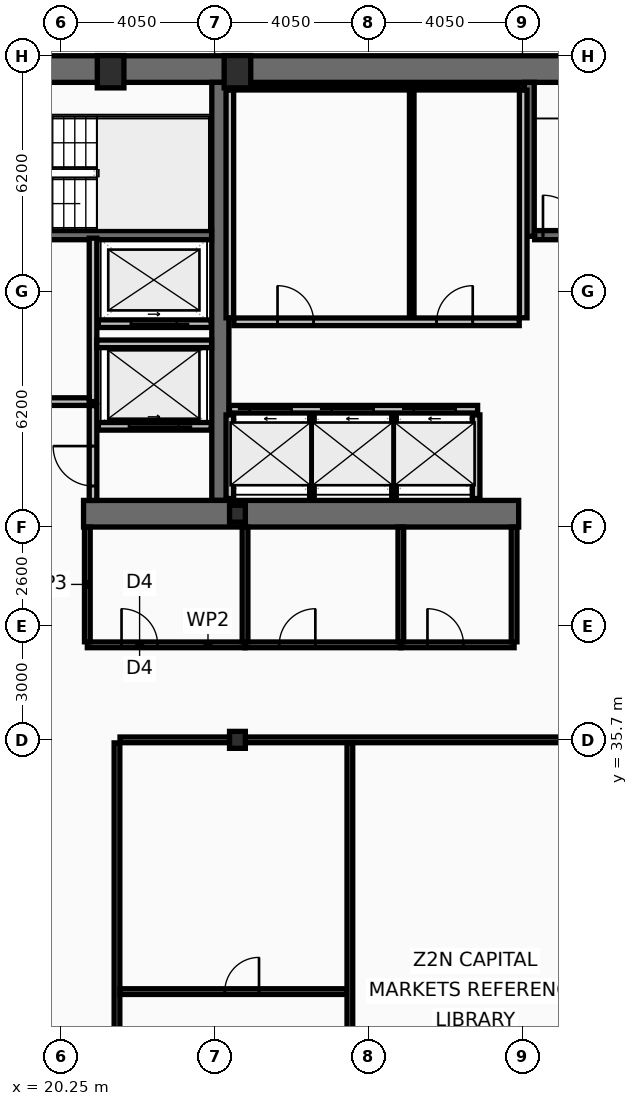
"""IFC4 building model, lengths in metres.
Left out: names, types, materials, properties, quantities, classifications, styles, units other than length and angle.
Written with IfcOpenShell. Run it as: python <this file> out.ifc"""

import sys

from ifc_helpers import new_model, si_unit, direction, frame, frame_2d, origin, origin_2d, place, context, subcontext, project, spatial, rectangle, hollow_rectangle, i_section, extrude, element, fill, save


model = new_model("IFC4")
c1 = context("Model", 3, precision=1e-05, world=origin(), true_north=direction((0.0, 1.0)))
c2 = subcontext(c1, "Body", "Model", "MODEL_VIEW")
j1 = project(units=[si_unit("LENGTHUNIT", "METRE"), si_unit("PLANEANGLEUNIT", "RADIAN")], contexts=[c1])
p1 = place(None, origin())
s1 = spatial("IfcSite", under=j1, at=p1, CompositionType="ELEMENT")
p2 = place(p1, origin())
s2 = spatial("IfcBuilding", under=s1, at=p2, CompositionType="ELEMENT")
p3 = place(p2, frame((0.0, 0.0, 114.6)))
s3 = spatial("IfcBuildingStorey", under=s2, at=p3, CompositionType="ELEMENT", Elevation=114.6)
p4 = place(p3, frame((16.2, 53.35, 0.0), z_axis=(0.0, 0.0, 1.0), x_axis=(1.0, 0.0, 0.0)))
e1 = element("IfcWall", 1, at=p4, inside=s3, PredefinedType="SHEAR", context=c2, shape_type="SweptSolid", body=[
    extrude(rectangle(XDim=40.5, YDim=0.7, at=frame_2d((20.25, 0.0))), origin(), (0.0, 0.0, 1.0), 3.44),
])
p5 = place(p3, frame((24.45, 42.0, 0.0), z_axis=(0.0, 0.0, 1.0), x_axis=(0.0, 1.0, 0.0)))
e2 = element("IfcWall", 2, at=p5, inside=s3, PredefinedType="SHEAR", context=c2, shape_type="SweptSolid", body=[
    extrude(rectangle(XDim=11.0, YDim=0.45, at=frame_2d((5.5, 0.0))), origin(), (0.0, 0.0, 1.0), 3.44),
])
p6 = place(p3, frame((32.3, 41.65, 0.0), z_axis=(0.0, 0.0, 1.0), x_axis=(-1.0, 0.0, 0.0)))
e3 = element("IfcWall", 3, at=p6, inside=s3, PredefinedType="SHEAR", context=c2, shape_type="SweptSolid", body=[
    extrude(rectangle(XDim=11.45, YDim=0.7, at=frame_2d((5.725, 0.0))), origin(), (0.0, 0.0, 1.0), 3.44),
])
p7 = place(p3, frame((32.58, 48.95, 0.0), z_axis=(0.0, 0.0, 1.0), x_axis=(0.0, 1.0, 0.0)))
e4 = element("IfcWall", 4, at=p7, inside=s3, PredefinedType="SHEAR", context=c2, shape_type="SweptSolid", body=[
    extrude(rectangle(XDim=4.05, YDim=0.26, at=frame_2d((2.025, 0.0))), origin(), (0.0, 0.0, 1.0), 3.44),
])
p8 = place(p3, frame((16.9, 48.98, 0.0), z_axis=(0.0, 0.0, 1.0), x_axis=(1.0, 0.0, 0.0)))
e5 = element("IfcWall", 5, at=p8, inside=s3, PredefinedType="SHEAR", context=c2, shape_type="SweptSolid", body=[
    extrude(rectangle(XDim=7.32, YDim=0.24, at=frame_2d((3.66, 0.0))), origin(), (0.0, 0.0, 1.0), 3.44),
])
p9 = place(p8, frame((0.22, 0.0, 0.0)))
e6 = element("IfcOpeningElement", 6, at=p9, cuts=e5, PredefinedType="OPENING", context=c2, shape_type="SweptSolid", body=[
    extrude(rectangle(XDim=1.05, YDim=2.15, at=frame_2d((0.525, 1.075))), frame((0.0, 0.13, 0.0), z_axis=(0.0, -1.0, 0.0), x_axis=(1.0, 0.0, 0.0)), (0.0, 0.0, 1.0), 0.26),
])
p10 = place(p3, frame((32.72, 48.98, 0.0), z_axis=(0.0, 0.0, 1.0), x_axis=(1.0, 0.0, 0.0)))
e7 = element("IfcWall", 7, at=p10, inside=s3, PredefinedType="SHEAR", context=c2, shape_type="SweptSolid", body=[
    extrude(rectangle(XDim=7.56, YDim=0.24, at=frame_2d((3.78, 0.0))), origin(), (0.0, 0.0, 1.0), 3.44),
])
p11 = place(p10, frame((0.22, 0.0, 0.0)))
e8 = element("IfcOpeningElement", 8, at=p11, cuts=e7, PredefinedType="OPENING", context=c2, shape_type="SweptSolid", body=[
    extrude(rectangle(XDim=1.05, YDim=2.15, at=frame_2d((0.525, 1.075))), frame((0.0, 0.13, 0.0), z_axis=(0.0, -1.0, 0.0), x_axis=(1.0, 0.0, 0.0)), (0.0, 0.0, 1.0), 0.26),
])
for number, where, z_axis, x_axis in (
    (9, (21.562, 53.28, 0.0), (0.0, 0.0, 1.0), (1.0, 0.0, 0.0)),
    (10, (24.9, 53.28, 0.0), (0.0, 0.0, 1.0), (1.0, 0.0, 0.0)),
):
    element("IfcColumn", number, at=place(p3, frame(where, z_axis=z_axis, x_axis=x_axis)), inside=s3, PredefinedType="COLUMN", context=c2, shape_type="SweptSolid", body=[
        extrude(hollow_rectangle(XDim=0.7, YDim=0.85, WallThickness=0.05, at=origin_2d()), origin(), (0.0, 0.0, 1.0), 3.6),
    ])
for number, where, z_axis, x_axis in (
    (11, (24.9, 35.7, 0.0), (0.0, 0.0, 1.0), (1.0, 0.0, 0.0)),
    (12, (24.9, 41.65, 0.0), (0.0, 0.0, 1.0), (1.0, 0.0, 0.0)),
):
    element("IfcColumn", number, at=place(p3, frame(where, z_axis=z_axis, x_axis=x_axis)), inside=s3, PredefinedType="COLUMN", context=c2, shape_type="SweptSolid", body=[
        extrude(i_section(OverallWidth=0.416, OverallDepth=0.446, WebThickness=0.039, FlangeThickness=0.063, at=origin_2d()), origin(), (0.0, 0.0, 1.0), 3.6),
    ])
p12 = place(p3, frame((24.69, 44.4, 0.0), z_axis=(0.0, 0.0, 1.0), x_axis=(1.0, 0.0, 0.0)))
e13 = element("IfcWall", 13, at=p12, inside=s3, PredefinedType="PARTITIONING", context=c2, shape_type="SweptSolid", body=[
    extrude(rectangle(XDim=6.53, YDim=0.2, at=frame_2d((3.265, 0.0))), origin(), (0.0, 0.0, 1.0), 3.44),
])
p13 = place(p12, frame((0.53, 0.0, 0.0)))
e14 = element("IfcOpeningElement", 14, at=p13, cuts=e13, PredefinedType="OPENING", context=c2, shape_type="SweptSolid", body=[
    extrude(rectangle(XDim=1.1, YDim=2.18, at=frame_2d((0.55, 1.09))), frame((0.0, 0.11, 0.0), z_axis=(0.0, -1.0, 0.0), x_axis=(1.0, 0.0, 0.0)), (0.0, 0.0, 1.0), 0.22),
])
p14 = place(p12, frame((2.69, 0.0, 0.0)))
e15 = element("IfcOpeningElement", 15, at=p14, cuts=e13, PredefinedType="OPENING", context=c2, shape_type="SweptSolid", body=[
    extrude(rectangle(XDim=1.1, YDim=2.18, at=frame_2d((0.55, 1.09))), frame((0.0, 0.11, 0.0), z_axis=(0.0, -1.0, 0.0), x_axis=(1.0, 0.0, 0.0)), (0.0, 0.0, 1.0), 0.22),
])
p15 = place(p12, frame((4.85, 0.0, 0.0)))
e16 = element("IfcOpeningElement", 16, at=p15, cuts=e13, PredefinedType="OPENING", context=c2, shape_type="SweptSolid", body=[
    extrude(rectangle(XDim=1.1, YDim=2.18, at=frame_2d((0.55, 1.09))), frame((0.0, 0.11, 0.0), z_axis=(0.0, -1.0, 0.0), x_axis=(1.0, 0.0, 0.0)), (0.0, 0.0, 1.0), 0.22),
])
p16 = place(p3, frame((24.21, 43.95, 0.0), z_axis=(0.0, 0.0, 1.0), x_axis=(-1.0, 0.0, 0.0)))
e17 = element("IfcWall", 17, at=p16, inside=s3, PredefinedType="PARTITIONING", context=c2, shape_type="SweptSolid", body=[
    extrude(rectangle(XDim=2.97, YDim=0.2, at=frame_2d((1.485, 0.0))), origin(), (0.0, 0.0, 1.0), 3.44),
])
p17 = place(p16, frame((0.86, 0.0, 0.0)))
e18 = element("IfcOpeningElement", 18, at=p17, cuts=e17, PredefinedType="OPENING", context=c2, shape_type="SweptSolid", body=[
    extrude(rectangle(XDim=1.3, YDim=2.18, at=frame_2d((0.65, 1.09))), frame((0.0, 0.11, 0.0), z_axis=(0.0, -1.0, 0.0), x_axis=(1.0, 0.0, 0.0)), (0.0, 0.0, 1.0), 0.22),
])
p18 = place(p3, frame((24.21, 46.65, 0.0), z_axis=(0.0, 0.0, 1.0), x_axis=(-1.0, 0.0, 0.0)))
e19 = element("IfcWall", 19, at=p18, inside=s3, PredefinedType="PARTITIONING", context=c2, shape_type="SweptSolid", body=[
    extrude(rectangle(XDim=2.97, YDim=0.2, at=frame_2d((1.485, 0.0))), origin(), (0.0, 0.0, 1.0), 3.44),
])
p19 = place(p18, frame((0.91, 0.0, 0.0)))
e20 = element("IfcOpeningElement", 20, at=p19, cuts=e19, PredefinedType="OPENING", context=c2, shape_type="SweptSolid", body=[
    extrude(rectangle(XDim=1.2, YDim=2.18, at=frame_2d((0.6, 1.09))), frame((0.0, 0.11, 0.0), z_axis=(0.0, -1.0, 0.0), x_axis=(1.0, 0.0, 0.0)), (0.0, 0.0, 1.0), 0.22),
])
p20 = place(p3, frame((21.1, 44.6, 0.0), z_axis=(0.0, 0.0, 1.0), x_axis=(0.0, 1.0, 0.0)))
e21 = element("IfcWall", 21, at=p20, inside=s3, PredefinedType="PARTITIONING", context=c2, shape_type="SweptSolid", body=[
    extrude(rectangle(XDim=4.3, YDim=0.2, at=frame_2d((2.15, 0.0))), origin(), (0.0, 0.0, 1.0), 3.44),
])
p21 = place(p3, frame((16.9, 44.6, 0.0), z_axis=(0.0, 0.0, 1.0), x_axis=(1.0, 0.0, 0.0)))
e22 = element("IfcWall", 22, at=p21, inside=s3, PredefinedType="PARTITIONING", context=c2, shape_type="SweptSolid", body=[
    extrude(rectangle(XDim=4.1, YDim=0.2, at=frame_2d((2.05, 0.0))), origin(), (0.0, 0.0, 1.0), 3.44),
])
p22 = place(p21, frame((1.25, 0.0, 0.0)))
e23 = element("IfcOpeningElement", 23, at=p22, cuts=e22, PredefinedType="OPENING", context=c2, shape_type="SweptSolid", body=[
    extrude(rectangle(XDim=1.05, YDim=2.15, at=frame_2d((0.525, 1.075))), frame((0.0, 0.11, 0.0), z_axis=(0.0, -1.0, 0.0), x_axis=(1.0, 0.0, 0.0)), (0.0, 0.0, 1.0), 0.22),
])
p23 = place(p3, frame((21.2, 46.12, 0.0), z_axis=(0.0, 0.0, 1.0), x_axis=(1.0, 0.0, 0.0)))
e24 = element("IfcWall", 24, at=p23, inside=s3, PredefinedType="PARTITIONING", context=c2, shape_type="SweptSolid", body=[
    extrude(rectangle(XDim=3.02, YDim=0.2, at=frame_2d((1.51, 0.0))), origin(), (0.0, 0.0, 1.0), 3.44),
])
p24 = place(p3, frame((21.1, 42.0, 0.0), z_axis=(0.0, 0.0, 1.0), x_axis=(0.0, 1.0, 0.0)))
e25 = element("IfcWall", 25, at=p24, inside=s3, PredefinedType="PARTITIONING", context=c2, shape_type="SweptSolid", body=[
    extrude(rectangle(XDim=2.495, YDim=0.2, at=frame_2d((1.248, 0.0))), origin(), (0.0, 0.0, 1.0), 3.44),
])
p25 = place(p24, frame((0.38, 0.0, 0.0)))
e26 = element("IfcOpeningElement", 26, at=p25, cuts=e25, PredefinedType="OPENING", context=c2, shape_type="SweptSolid", body=[
    extrude(rectangle(XDim=1.05, YDim=2.15, at=frame_2d((0.525, 1.075))), frame((0.0, 0.11, 0.0), z_axis=(0.0, -1.0, 0.0), x_axis=(1.0, 0.0, 0.0)), (0.0, 0.0, 1.0), 0.22),
])
for number, where, z_axis, x_axis in (
    (27, (24.7, 46.805, 0.0), (0.0, 0.0, 1.0), (0.0, 1.0, 0.0)),
    (28, (32.42, 46.805, 0.0), (0.0, 0.0, 1.0), (0.0, 1.0, 0.0)),
):
    element("IfcWall", number, at=place(p3, frame(where, z_axis=z_axis, x_axis=x_axis)), inside=s3, PredefinedType="PARTITIONING", context=c2, shape_type="SweptSolid", body=[
        extrude(rectangle(XDim=5.99, YDim=0.2, at=frame_2d((2.995, 0.0))), origin(), (0.0, 0.0, 1.0), 3.44),
    ])
p26 = place(p3, frame((24.805, 52.86, 0.0), z_axis=(0.0, 0.0, 1.0), x_axis=(1.0, 0.0, 0.0)))
e29 = element("IfcWall", 29, at=p26, inside=s3, PredefinedType="PARTITIONING", context=c2, shape_type="SweptSolid", body=[
    extrude(rectangle(XDim=7.51, YDim=0.12, at=frame_2d((3.755, 0.0))), origin(), (0.0, 0.0, 1.0), 3.44),
])
p27 = place(p3, frame((29.486, 46.805, 0.0), z_axis=(0.0, 0.0, 1.0), x_axis=(0.0, 1.0, 0.0)))
e30 = element("IfcWall", 30, at=p27, inside=s3, PredefinedType="PARTITIONING", context=c2, shape_type="SweptSolid", body=[
    extrude(rectangle(XDim=5.99, YDim=0.12, at=frame_2d((2.995, 0.0))), origin(), (0.0, 0.0, 1.0), 3.44),
])
p28 = place(p3, frame((24.805, 46.7, 0.0), z_axis=(0.0, 0.0, 1.0), x_axis=(1.0, 0.0, 0.0)))
e31 = element("IfcWall", 31, at=p28, inside=s3, PredefinedType="PARTITIONING", context=c2, shape_type="SweptSolid", body=[
    extrude(rectangle(XDim=7.51, YDim=0.2, at=frame_2d((3.755, 0.0))), origin(), (0.0, 0.0, 1.0), 3.44),
])
p29 = place(p28, frame((1.15, 0.0, 0.0)))
e32 = element("IfcOpeningElement", 32, at=p29, cuts=e31, PredefinedType="OPENING", context=c2, shape_type="SweptSolid", body=[
    extrude(rectangle(XDim=0.95, YDim=2.1, at=frame_2d((0.475, 1.05))), frame((0.0, 0.11, 0.0), z_axis=(0.0, -1.0, 0.0), x_axis=(1.0, 0.0, 0.0)), (0.0, 0.0, 1.0), 0.22),
])
p30 = place(p28, frame((5.336, 0.0, 0.0)))
e33 = element("IfcOpeningElement", 33, at=p30, cuts=e31, PredefinedType="OPENING", context=c2, shape_type="SweptSolid", body=[
    extrude(rectangle(XDim=0.95, YDim=2.1, at=frame_2d((0.475, 1.05))), frame((0.0, 0.11, 0.0), z_axis=(0.0, -1.0, 0.0), x_axis=(1.0, 0.0, 0.0)), (0.0, 0.0, 1.0), 0.22),
])
for number, where, z_axis, x_axis in (
    (34, (24.7, 42.05, 0.0), (0.0, 0.0, 1.0), (0.0, 1.0, 0.0)),
    (35, (31.18, 42.05, 0.0), (0.0, 0.0, 1.0), (0.0, 1.0, 0.0)),
):
    element("IfcWall", number, at=place(p3, frame(where, z_axis=z_axis, x_axis=x_axis)), inside=s3, PredefinedType="PARTITIONING", context=c2, shape_type="SweptSolid", body=[
        extrude(rectangle(XDim=2.2, YDim=0.2, at=frame_2d((1.1, 0.0))), origin(), (0.0, 0.0, 1.0), 3.44),
    ])
for number, where, z_axis, x_axis in (
    (36, (26.86, 42.05, 0.0), (0.0, 0.0, 1.0), (0.0, 1.0, 0.0)),
    (37, (29.02, 42.05, 0.0), (0.0, 0.0, 1.0), (0.0, 1.0, 0.0)),
):
    element("IfcWall", number, at=place(p3, frame(where, z_axis=z_axis, x_axis=x_axis)), inside=s3, PredefinedType="PARTITIONING", context=c2, shape_type="SweptSolid", body=[
        extrude(rectangle(XDim=2.2, YDim=0.12, at=frame_2d((1.1, 0.0))), origin(), (0.0, 0.0, 1.0), 3.44),
    ])
p31 = place(p3, frame((20.95, 38.2, 0.0), z_axis=(0.0, 0.0, 1.0), x_axis=(1.0, 0.0, 0.0)))
e38 = element("IfcWall", 38, at=p31, inside=s3, PredefinedType="PARTITIONING", context=c2, shape_type="SweptSolid", body=[
    extrude(rectangle(XDim=4.15, YDim=0.15, at=frame_2d((2.075, 0.0))), origin(), (0.0, 0.0, 1.0), 2.73),
])
p32 = place(p31, frame((0.9, 0.0, 0.0)))
e39 = element("IfcOpeningElement", 39, at=p32, cuts=e38, PredefinedType="OPENING", context=c2, shape_type="SweptSolid", body=[
    extrude(rectangle(XDim=0.95, YDim=2.05, at=frame_2d((0.475, 1.025))), frame((0.0, 0.085, 0.0), z_axis=(0.0, -1.0, 0.0), x_axis=(1.0, 0.0, 0.0)), (0.0, 0.0, 1.0), 0.17),
])
p33 = place(p3, frame((25.1, 38.2, 0.0), z_axis=(0.0, 0.0, 1.0), x_axis=(1.0, 0.0, 0.0)))
e40 = element("IfcWall", 40, at=p33, inside=s3, PredefinedType="PARTITIONING", context=c2, shape_type="SweptSolid", body=[
    extrude(rectangle(XDim=4.1, YDim=0.15, at=frame_2d((2.05, 0.0))), origin(), (0.0, 0.0, 1.0), 2.73),
])
p34 = place(p33, frame((0.9, 0.0, 0.0)))
e41 = element("IfcOpeningElement", 41, at=p34, cuts=e40, PredefinedType="OPENING", context=c2, shape_type="SweptSolid", body=[
    extrude(rectangle(XDim=0.95, YDim=2.05, at=frame_2d((0.475, 1.025))), frame((0.0, 0.085, 0.0), z_axis=(0.0, -1.0, 0.0), x_axis=(1.0, 0.0, 0.0)), (0.0, 0.0, 1.0), 0.17),
])
p35 = place(p3, frame((29.2, 38.2, 0.0), z_axis=(0.0, 0.0, 1.0), x_axis=(1.0, 0.0, 0.0)))
e42 = element("IfcWall", 42, at=p35, inside=s3, PredefinedType="PARTITIONING", context=c2, shape_type="SweptSolid", body=[
    extrude(rectangle(XDim=2.98, YDim=0.15, at=frame_2d((1.49, 0.0))), origin(), (0.0, 0.0, 1.0), 2.73),
])
p36 = place(p35, frame((0.7, 0.0, 0.0)))
e43 = element("IfcOpeningElement", 43, at=p36, cuts=e42, PredefinedType="OPENING", context=c2, shape_type="SweptSolid", body=[
    extrude(rectangle(XDim=0.95, YDim=2.05, at=frame_2d((0.475, 1.025))), frame((0.0, 0.085, 0.0), z_axis=(0.0, -1.0, 0.0), x_axis=(1.0, 0.0, 0.0)), (0.0, 0.0, 1.0), 0.17),
])
p37 = place(p3, frame((20.95, 38.28, 0.0), z_axis=(0.0, 0.0, 1.0), x_axis=(0.0, 1.0, 0.0)))
e44 = element("IfcWall", 44, at=p37, inside=s3, PredefinedType="PARTITIONING", context=c2, shape_type="SweptSolid", body=[
    extrude(rectangle(XDim=3.02, YDim=0.15, at=frame_2d((1.51, 0.0))), origin(), (0.0, 0.0, 1.0), 3.44),
])
p38 = place(p3, frame((25.1, 38.28, 0.0), z_axis=(0.0, 0.0, 1.0), x_axis=(0.0, 1.0, 0.0)))
e45 = element("IfcWall", 45, at=p38, inside=s3, PredefinedType="PARTITIONING", context=c2, shape_type="SweptSolid", body=[
    extrude(rectangle(XDim=3.02, YDim=0.15, at=frame_2d((1.51, 0.0))), origin(), (0.0, 0.0, 1.0), 2.73),
])
for number, where, z_axis, x_axis in (
    (46, (29.2, 38.28, 0.0), (0.0, 0.0, 1.0), (0.0, 1.0, 0.0)),
    (47, (32.18, 38.28, 0.0), (0.0, 0.0, 1.0), (0.0, 1.0, 0.0)),
):
    element("IfcWall", number, at=place(p3, frame(where, z_axis=z_axis, x_axis=x_axis)), inside=s3, PredefinedType="PARTITIONING", context=c2, shape_type="SweptSolid", body=[
        extrude(rectangle(XDim=3.02, YDim=0.15, at=frame_2d((1.51, 0.0))), origin(), (0.0, 0.0, 1.0), 3.44),
    ])
p39 = place(p3, frame((21.73, 21.385, 0.0), z_axis=(0.0, 0.0, 1.0), x_axis=(0.0, 1.0, 0.0)))
e48 = element("IfcWall", 48, at=p39, inside=s3, PredefinedType="PARTITIONING", context=c2, shape_type="SweptSolid", body=[
    extrude(rectangle(XDim=14.235, YDim=0.15, at=frame_2d((7.118, 0.0))), origin(), (0.0, 0.0, 1.0), 2.88),
])
p40 = place(p3, frame((21.81, 35.7, 0.0), z_axis=(0.0, 0.0, 1.0), x_axis=(1.0, 0.0, 0.0)))
e49 = element("IfcWall", 49, at=p40, inside=s3, PredefinedType="PARTITIONING", context=c2, shape_type="SweptSolid", body=[
    extrude(rectangle(XDim=46.995, YDim=0.15, at=frame_2d((23.498, 0.0))), origin(), (0.0, 0.0, 1.0), 2.73),
])
p41 = place(p3, frame((21.81, 29.076, 0.0), z_axis=(0.0, 0.0, 1.0), x_axis=(1.0, 0.0, 0.0)))
e50 = element("IfcWall", 50, at=p41, inside=s3, PredefinedType="PARTITIONING", context=c2, shape_type="SweptSolid", body=[
    extrude(rectangle(XDim=5.968, YDim=0.15, at=frame_2d((2.984, 0.0))), origin(), (0.0, 0.0, 1.0), 2.73),
])
p42 = place(p41, frame((2.758, 0.0, 0.0)))
e51 = element("IfcOpeningElement", 51, at=p42, cuts=e50, PredefinedType="OPENING", context=c2, shape_type="SweptSolid", body=[
    extrude(rectangle(XDim=0.9, YDim=2.05, at=frame_2d((0.45, 1.025))), frame((0.0, 0.085, 0.0), z_axis=(0.0, -1.0, 0.0), x_axis=(1.0, 0.0, 0.0)), (0.0, 0.0, 1.0), 0.17),
])
p43 = place(p3, frame((27.858, 21.385, 0.0), z_axis=(0.0, 0.0, 1.0), x_axis=(0.0, 1.0, 0.0)))
e52 = element("IfcWall", 52, at=p43, inside=s3, PredefinedType="PARTITIONING", context=c2, shape_type="SweptSolid", body=[
    extrude(rectangle(XDim=14.235, YDim=0.15, at=frame_2d((7.118, 0.0))), origin(), (0.0, 0.0, 1.0), 2.88),
])
p44 = place(p11, origin())
e53 = element("IfcDoor", 53, at=p44, inside=s3, OperationType="SINGLE_SWING_LEFT", PredefinedType="DOOR", context=c2, shape_type="SweptSolid", body=[
    extrude(rectangle(XDim=1.05, YDim=2.15, at=frame_2d((0.525, 1.075))), frame((0.0, 0.025, 0.0), z_axis=(0.0, -1.0, 0.0), x_axis=(1.0, 0.0, 0.0)), (0.0, 0.0, 1.0), 0.05),
])
fill(e8, e53)
p45 = place(p13, origin())
e54 = element("IfcDoor", 54, at=p45, inside=s3, OperationType="SLIDING_TO_LEFT", PredefinedType="DOOR", context=c2, shape_type="SweptSolid", body=[
    extrude(rectangle(XDim=1.1, YDim=2.18, at=frame_2d((0.55, 1.09))), frame((0.0, 0.025, 0.0), z_axis=(0.0, -1.0, 0.0), x_axis=(1.0, 0.0, 0.0)), (0.0, 0.0, 1.0), 0.05),
])
fill(e14, e54)
p46 = place(p14, origin())
e55 = element("IfcDoor", 55, at=p46, inside=s3, OperationType="SLIDING_TO_LEFT", PredefinedType="DOOR", context=c2, shape_type="SweptSolid", body=[
    extrude(rectangle(XDim=1.1, YDim=2.18, at=frame_2d((0.55, 1.09))), frame((0.0, 0.025, 0.0), z_axis=(0.0, -1.0, 0.0), x_axis=(1.0, 0.0, 0.0)), (0.0, 0.0, 1.0), 0.05),
])
fill(e15, e55)
p47 = place(p15, origin())
e56 = element("IfcDoor", 56, at=p47, inside=s3, OperationType="SLIDING_TO_LEFT", PredefinedType="DOOR", context=c2, shape_type="SweptSolid", body=[
    extrude(rectangle(XDim=1.1, YDim=2.18, at=frame_2d((0.55, 1.09))), frame((0.0, 0.025, 0.0), z_axis=(0.0, -1.0, 0.0), x_axis=(1.0, 0.0, 0.0)), (0.0, 0.0, 1.0), 0.05),
])
fill(e16, e56)
p48 = place(p17, origin())
e57 = element("IfcDoor", 57, at=p48, inside=s3, OperationType="SLIDING_TO_LEFT", PredefinedType="DOOR", context=c2, shape_type="SweptSolid", body=[
    extrude(rectangle(XDim=1.3, YDim=2.18, at=frame_2d((0.65, 1.09))), frame((0.0, 0.025, 0.0), z_axis=(0.0, -1.0, 0.0), x_axis=(1.0, 0.0, 0.0)), (0.0, 0.0, 1.0), 0.05),
])
fill(e18, e57)
p49 = place(p19, origin())
e58 = element("IfcDoor", 58, at=p49, inside=s3, OperationType="SLIDING_TO_LEFT", PredefinedType="DOOR", context=c2, shape_type="SweptSolid", body=[
    extrude(rectangle(XDim=1.2, YDim=2.18, at=frame_2d((0.6, 1.09))), frame((0.0, 0.025, 0.0), z_axis=(0.0, -1.0, 0.0), x_axis=(1.0, 0.0, 0.0)), (0.0, 0.0, 1.0), 0.05),
])
fill(e20, e58)
p50 = place(p25, origin())
e59 = element("IfcDoor", 59, at=p50, inside=s3, OperationType="SINGLE_SWING_RIGHT", PredefinedType="DOOR", context=c2, shape_type="SweptSolid", body=[
    extrude(rectangle(XDim=1.05, YDim=2.15, at=frame_2d((0.525, 1.075))), frame((0.0, 0.025, 0.0), z_axis=(0.0, -1.0, 0.0), x_axis=(1.0, 0.0, 0.0)), (0.0, 0.0, 1.0), 0.05),
])
fill(e26, e59)
p51 = place(p29, origin())
e60 = element("IfcDoor", 60, at=p51, inside=s3, OperationType="SINGLE_SWING_LEFT", PredefinedType="DOOR", context=c2, shape_type="SweptSolid", body=[
    extrude(rectangle(XDim=0.95, YDim=2.1, at=frame_2d((0.475, 1.05))), frame((0.0, 0.025, 0.0), z_axis=(0.0, -1.0, 0.0), x_axis=(1.0, 0.0, 0.0)), (0.0, 0.0, 1.0), 0.05),
])
fill(e32, e60)
p52 = place(p30, origin())
e61 = element("IfcDoor", 61, at=p52, inside=s3, OperationType="SINGLE_SWING_RIGHT", PredefinedType="DOOR", context=c2, shape_type="SweptSolid", body=[
    extrude(rectangle(XDim=0.95, YDim=2.1, at=frame_2d((0.475, 1.05))), frame((0.0, 0.025, 0.0), z_axis=(0.0, -1.0, 0.0), x_axis=(1.0, 0.0, 0.0)), (0.0, 0.0, 1.0), 0.05),
])
fill(e33, e61)
p53 = place(p32, origin())
e62 = element("IfcDoor", 62, at=p53, inside=s3, OperationType="SINGLE_SWING_LEFT", PredefinedType="DOOR", context=c2, shape_type="SweptSolid", body=[
    extrude(rectangle(XDim=0.95, YDim=2.05, at=frame_2d((0.475, 1.025))), frame((0.0, 0.025, 0.0), z_axis=(0.0, -1.0, 0.0), x_axis=(1.0, 0.0, 0.0)), (0.0, 0.0, 1.0), 0.05),
])
fill(e39, e62)
p54 = place(p34, origin())
e63 = element("IfcDoor", 63, at=p54, inside=s3, OperationType="SINGLE_SWING_RIGHT", PredefinedType="DOOR", context=c2, shape_type="SweptSolid", body=[
    extrude(rectangle(XDim=0.95, YDim=2.05, at=frame_2d((0.475, 1.025))), frame((0.0, 0.025, 0.0), z_axis=(0.0, -1.0, 0.0), x_axis=(1.0, 0.0, 0.0)), (0.0, 0.0, 1.0), 0.05),
])
fill(e41, e63)
p55 = place(p36, origin())
e64 = element("IfcDoor", 64, at=p55, inside=s3, OperationType="SINGLE_SWING_LEFT", PredefinedType="DOOR", context=c2, shape_type="SweptSolid", body=[
    extrude(rectangle(XDim=0.95, YDim=2.05, at=frame_2d((0.475, 1.025))), frame((0.0, 0.025, 0.0), z_axis=(0.0, -1.0, 0.0), x_axis=(1.0, 0.0, 0.0)), (0.0, 0.0, 1.0), 0.05),
])
fill(e43, e64)
p56 = place(p42, origin())
e65 = element("IfcDoor", 65, at=p56, inside=s3, OperationType="SINGLE_SWING_RIGHT", PredefinedType="DOOR", context=c2, shape_type="SweptSolid", body=[
    extrude(rectangle(XDim=0.9, YDim=2.05, at=frame_2d((0.45, 1.025))), frame((0.0, 0.025, 0.0), z_axis=(0.0, -1.0, 0.0), x_axis=(1.0, 0.0, 0.0)), (0.0, 0.0, 1.0), 0.05),
])
fill(e51, e65)
save(model, sys.argv[1])
